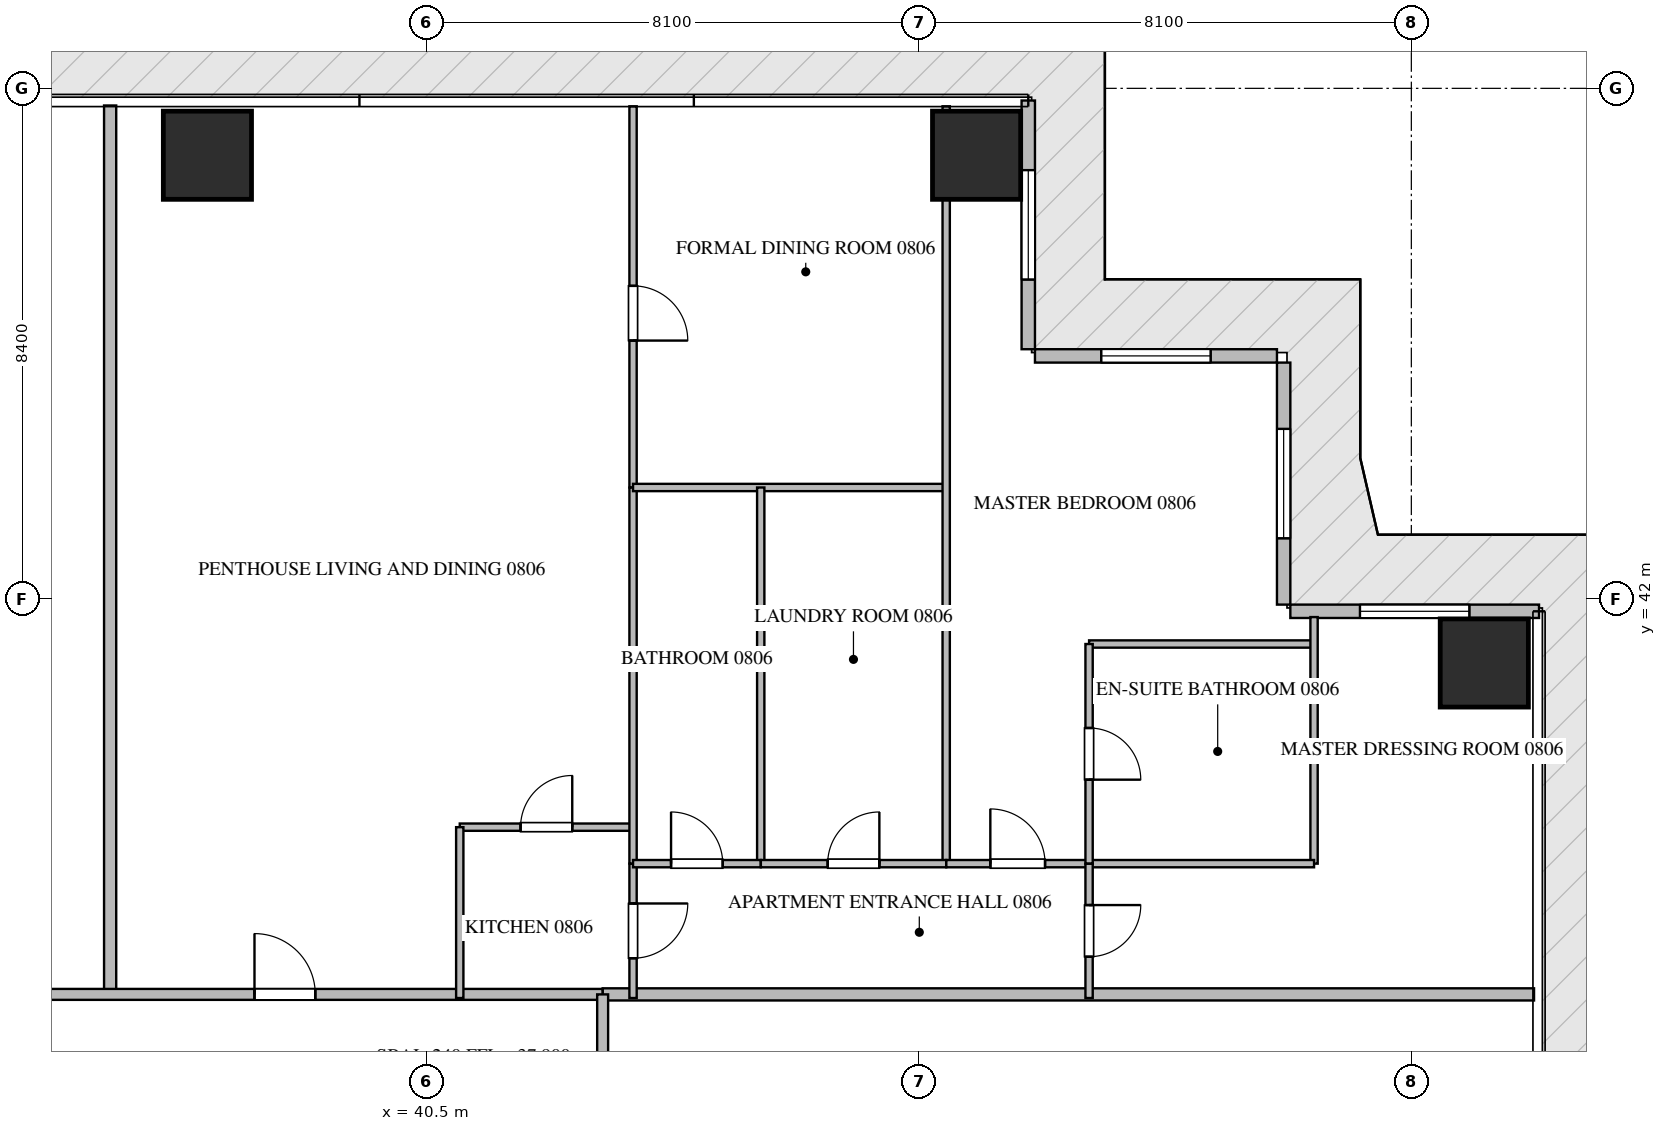
"""IFC4 building model, lengths in metres.
Left out: names, types, materials, properties, quantities, classifications, styles, units other than length and angle.
Written with IfcOpenShell. Run it as: python <this file> out.ifc"""

import sys

from ifc_helpers import new_model, si_unit, direction, frame, frame_2d, origin, origin_2d, place, context, subcontext, project, spatial, rectangle, extrude, source, transform, mapped, element, fill, save


model = new_model("IFC4")
c1 = context("Model", 3, precision=1e-05, world=origin(), true_north=direction((0.0, 1.0)))
c2 = subcontext(c1, "Body", "Model", "MODEL_VIEW")
j1 = project(units=[si_unit("LENGTHUNIT", "METRE"), si_unit("PLANEANGLEUNIT", "RADIAN")], contexts=[c1])
p1 = place(None, origin())
s1 = spatial("IfcSite", under=j1, at=p1, CompositionType="ELEMENT")
p2 = place(p1, origin())
s2 = spatial("IfcBuilding", under=s1, at=p2, CompositionType="ELEMENT")
p3 = place(p2, frame((0.0, 0.0, 37.95)))
s3 = spatial("IfcBuildingStorey", under=s2, at=p3, CompositionType="ELEMENT", Elevation=37.95)
m1 = source(origin(), c2, "Body", "SweptSolid", [
    extrude(rectangle(XDim=1.45, YDim=1.45, at=origin_2d()), origin(), (0.0, 0.0, 1.0), 3.75),
])
for number, where, z_axis, x_axis in (
    (1, (36.9, 49.3, -0.26), (0.0, 0.0, 1.0), (1.0, 0.0, 0.0)),
    (2, (49.55, 49.3, -0.26), (0.0, 0.0, 1.0), (1.0, 0.0, 0.0)),
    (3, (57.9, 40.95, -0.26), (0.0, 0.0, 1.0), (1.0, 0.0, 0.0)),
):
    element("IfcColumn", number, at=place(p3, frame(where, z_axis=z_axis, x_axis=x_axis)), inside=s3, PredefinedType="COLUMN", context=c2, shape_type="MappedRepresentation", body=[
        mapped(m1, transform((0.0, 0.0, 0.0), scale=1.0)),
    ])
p4 = place(p3, frame((58.8, 41.8, 0.0), z_axis=(0.0, 0.0, 1.0), x_axis=(-1.0, 0.0, 0.0)))
e4 = element("IfcWall", 4, at=p4, inside=s3, PredefinedType="ELEMENTEDWALL", context=c2, shape_type="SweptSolid", body=[
    extrude(rectangle(XDim=4.09, YDim=0.22, at=frame_2d((2.045, 0.0))), origin(), (0.0, 0.0, 1.0), 3.475),
])
p5 = place(p4, frame((1.145, 0.0, 0.65)))
e5 = element("IfcOpeningElement", 5, at=p5, cuts=e4, PredefinedType="OPENING", context=c2, shape_type="SweptSolid", body=[
    extrude(rectangle(XDim=1.8, YDim=2.1, at=frame_2d((0.9, 1.05))), frame((0.0, 0.12, 0.0), z_axis=(0.0, -1.0, 0.0), x_axis=(1.0, 0.0, 0.0)), (0.0, 0.0, 1.0), 0.24),
])
p6 = place(p3, frame((54.6, 41.91, 0.0), z_axis=(0.0, 0.0, 1.0), x_axis=(0.0, 1.0, 0.0)))
e6 = element("IfcWall", 6, at=p6, inside=s3, PredefinedType="ELEMENTEDWALL", context=c2, shape_type="SweptSolid", body=[
    extrude(rectangle(XDim=3.98, YDim=0.22, at=frame_2d((1.99, 0.0))), origin(), (0.0, 0.0, 1.0), 3.475),
])
p7 = place(p6, frame((1.09, 0.0, 0.65)))
e7 = element("IfcOpeningElement", 7, at=p7, cuts=e6, PredefinedType="OPENING", context=c2, shape_type="SweptSolid", body=[
    extrude(rectangle(XDim=1.8, YDim=2.1, at=frame_2d((0.9, 1.05))), frame((0.0, 0.12, 0.0), z_axis=(0.0, -1.0, 0.0), x_axis=(1.0, 0.0, 0.0)), (0.0, 0.0, 1.0), 0.24),
])
p8 = place(p3, frame((54.49, 46.0, 0.0), z_axis=(0.0, 0.0, 1.0), x_axis=(-1.0, 0.0, 0.0)))
e8 = element("IfcWall", 8, at=p8, inside=s3, PredefinedType="ELEMENTEDWALL", context=c2, shape_type="SweptSolid", body=[
    extrude(rectangle(XDim=3.98, YDim=0.22, at=frame_2d((1.99, 0.0))), origin(), (0.0, 0.0, 1.0), 3.475),
])
p9 = place(p8, frame((1.09, 0.0, 0.65)))
e9 = element("IfcOpeningElement", 9, at=p9, cuts=e8, PredefinedType="OPENING", context=c2, shape_type="SweptSolid", body=[
    extrude(rectangle(XDim=1.8, YDim=2.1, at=frame_2d((0.9, 1.05))), frame((0.0, 0.12, 0.0), z_axis=(0.0, -1.0, 0.0), x_axis=(1.0, 0.0, 0.0)), (0.0, 0.0, 1.0), 0.24),
])
p10 = place(p3, frame((50.4, 46.11, 0.0), z_axis=(0.0, 0.0, 1.0), x_axis=(0.0, 1.0, 0.0)))
e10 = element("IfcWall", 10, at=p10, inside=s3, PredefinedType="ELEMENTEDWALL", context=c2, shape_type="SweptSolid", body=[
    extrude(rectangle(XDim=4.09, YDim=0.22, at=frame_2d((2.045, 0.0))), origin(), (0.0, 0.0, 1.0), 3.475),
])
p11 = place(p10, frame((1.145, 0.0, 0.65)))
e11 = element("IfcOpeningElement", 11, at=p11, cuts=e10, PredefinedType="OPENING", context=c2, shape_type="SweptSolid", body=[
    extrude(rectangle(XDim=1.8, YDim=2.1, at=frame_2d((0.9, 1.05))), frame((0.0, 0.12, 0.0), z_axis=(0.0, -1.0, 0.0), x_axis=(1.0, 0.0, 0.0)), (0.0, 0.0, 1.0), 0.24),
])
p12 = place(p3, frame((35.3, 35.5, 0.0), z_axis=(0.0, 0.0, 1.0), x_axis=(0.0, 1.0, 0.0)))
e12 = element("IfcWall", 12, at=p12, inside=s3, PredefinedType="PARTITIONING", context=c2, shape_type="SweptSolid", body=[
    extrude(rectangle(XDim=14.618, YDim=0.2, at=frame_2d((7.309, 0.0))), origin(), (0.0, 0.0, 1.0), 3.49),
])
p13 = place(p3, frame((43.4, 35.5, 0.0), z_axis=(0.0, 0.0, 1.0), x_axis=(1.0, 0.0, 0.0)))
e13 = element("IfcWall", 13, at=p13, inside=s3, PredefinedType="PARTITIONING", context=c2, shape_type="SweptSolid", body=[
    extrude(rectangle(XDim=15.318, YDim=0.2, at=frame_2d((7.659, 0.0))), origin(), (0.0, 0.0, 1.0), 3.49),
])
p14 = place(p3, frame((21.402, 35.5, 0.0), z_axis=(0.0, 0.0, 1.0), x_axis=(1.0, 0.0, 0.0)))
e14 = element("IfcWall", 14, at=p14, inside=s3, PredefinedType="PARTITIONING", context=c2, shape_type="SweptSolid", body=[
    extrude(rectangle(XDim=21.996, YDim=0.18, at=frame_2d((10.998, 0.0))), origin(), (0.0, 0.0, 1.0), 3.49),
])
p15 = place(p14, frame((2.1, 0.0, 0.0)))
e15 = element("IfcOpeningElement", 15, at=p15, cuts=e14, PredefinedType="OPENING", context=c2, shape_type="SweptSolid", body=[
    extrude(rectangle(XDim=1.0, YDim=2.15, at=frame_2d((0.5, 1.075))), frame((0.0, 0.1, 0.0), z_axis=(0.0, -1.0, 0.0), x_axis=(1.0, 0.0, 0.0)), (0.0, 0.0, 1.0), 0.2),
])
p16 = place(p14, frame((10.498, 0.0, 0.0)))
e16 = element("IfcOpeningElement", 16, at=p16, cuts=e14, PredefinedType="OPENING", context=c2, shape_type="SweptSolid", body=[
    extrude(rectangle(XDim=1.0, YDim=2.15, at=frame_2d((0.5, 1.075))), frame((0.0, 0.1, 0.0), z_axis=(0.0, -1.0, 0.0), x_axis=(1.0, 0.0, 0.0)), (0.0, 0.0, 1.0), 0.2),
])
p17 = place(p14, frame((16.272, 0.0, 0.0)))
e17 = element("IfcOpeningElement", 17, at=p17, cuts=e14, PredefinedType="OPENING", context=c2, shape_type="SweptSolid", body=[
    extrude(rectangle(XDim=1.0, YDim=2.15, at=frame_2d((0.5, 1.075))), frame((0.0, 0.1, 0.0), z_axis=(0.0, -1.0, 0.0), x_axis=(1.0, 0.0, 0.0)), (0.0, 0.0, 1.0), 0.2),
])
p18 = place(p3, frame((43.4, 14.9, 0.0), z_axis=(0.0, 0.0, 1.0), x_axis=(0.0, 1.0, 0.0)))
e18 = element("IfcWall", 18, at=p18, inside=s3, PredefinedType="PARTITIONING", context=c2, shape_type="SweptSolid", body=[
    extrude(rectangle(XDim=20.6, YDim=0.18, at=frame_2d((10.3, 0.0))), origin(), (0.0, 0.0, 1.0), 3.49),
])
p19 = place(p18, frame((5.723, 0.0, 0.0)))
e19 = element("IfcOpeningElement", 19, at=p19, cuts=e18, PredefinedType="OPENING", context=c2, shape_type="SweptSolid", body=[
    extrude(rectangle(XDim=1.0, YDim=2.15, at=frame_2d((0.5, 1.075))), frame((0.0, 0.1, 0.0), z_axis=(0.0, -1.0, 0.0), x_axis=(1.0, 0.0, 0.0)), (0.0, 0.0, 1.0), 0.2),
])
p20 = place(p18, frame((17.64, 0.0, 0.0)))
e20 = element("IfcOpeningElement", 20, at=p20, cuts=e18, PredefinedType="OPENING", context=c2, shape_type="SweptSolid", body=[
    extrude(rectangle(XDim=1.0, YDim=2.15, at=frame_2d((0.5, 1.075))), frame((0.0, 0.1, 0.0), z_axis=(0.0, -1.0, 0.0), x_axis=(1.0, 0.0, 0.0)), (0.0, 0.0, 1.0), 0.2),
])
p21 = place(p3, frame((41.05, 38.25, 0.0), z_axis=(0.0, 0.0, 1.0), x_axis=(1.0, 0.0, 0.0)))
e21 = element("IfcWall", 21, at=p21, inside=s3, PredefinedType="PARTITIONING", context=c2, shape_type="SweptSolid", body=[
    extrude(rectangle(XDim=2.85, YDim=0.12, at=frame_2d((1.425, 0.0))), origin(), (0.0, 0.0, 1.0), 3.49),
])
p22 = place(p21, frame((1.0, 0.0, 0.0)))
e22 = element("IfcOpeningElement", 22, at=p22, cuts=e21, PredefinedType="OPENING", context=c2, shape_type="SweptSolid", body=[
    extrude(rectangle(XDim=0.85, YDim=2.1, at=frame_2d((0.425, 1.05))), frame((0.0, 0.07, 0.0), z_axis=(0.0, -1.0, 0.0), x_axis=(1.0, 0.0, 0.0)), (0.0, 0.0, 1.0), 0.14),
])
p23 = place(p3, frame((41.05, 38.25, 0.0), z_axis=(0.0, 0.0, 1.0), x_axis=(0.0, -1.0, 0.0)))
e23 = element("IfcWall", 23, at=p23, inside=s3, PredefinedType="PARTITIONING", context=c2, shape_type="SweptSolid", body=[
    extrude(rectangle(XDim=2.81, YDim=0.12, at=frame_2d((1.405, 0.0))), origin(), (0.0, 0.0, 1.0), 3.49),
])
p24 = place(p3, frame((43.9, 37.65, 0.0), z_axis=(0.0, 0.0, 1.0), x_axis=(0.0, -1.0, 0.0)))
e24 = element("IfcWall", 24, at=p24, inside=s3, PredefinedType="PARTITIONING", context=c2, shape_type="SweptSolid", body=[
    extrude(rectangle(XDim=2.21, YDim=0.12, at=frame_2d((1.105, 0.0))), origin(), (0.0, 0.0, 1.0), 3.49),
])
p25 = place(p24, frame((0.655, 0.0, 0.0)))
e25 = element("IfcOpeningElement", 25, at=p25, cuts=e24, PredefinedType="OPENING", context=c2, shape_type="SweptSolid", body=[
    extrude(rectangle(XDim=0.9, YDim=2.1, at=frame_2d((0.45, 1.05))), frame((0.0, 0.07, 0.0), z_axis=(0.0, -1.0, 0.0), x_axis=(1.0, 0.0, 0.0)), (0.0, 0.0, 1.0), 0.14),
])
p26 = place(p3, frame((43.9, 50.105, 0.0), z_axis=(0.0, 0.0, 1.0), x_axis=(0.0, -1.0, 0.0)))
e26 = element("IfcWall", 26, at=p26, inside=s3, PredefinedType="PARTITIONING", context=c2, shape_type="SweptSolid", body=[
    extrude(rectangle(XDim=6.269, YDim=0.12, at=frame_2d((3.135, 0.0))), origin(), (0.0, 0.0, 1.0), 3.49),
])
p27 = place(p26, frame((2.953, 0.0, 0.0)))
e27 = element("IfcOpeningElement", 27, at=p27, cuts=e26, PredefinedType="OPENING", context=c2, shape_type="SweptSolid", body=[
    extrude(rectangle(XDim=0.9, YDim=2.1, at=frame_2d((0.45, 1.05))), frame((0.0, 0.07, 0.0), z_axis=(0.0, -1.0, 0.0), x_axis=(1.0, 0.0, 0.0)), (0.0, 0.0, 1.0), 0.14),
])
p28 = place(p3, frame((43.9, 43.834, 0.0), z_axis=(0.0, 0.0, 1.0), x_axis=(0.0, -1.0, 0.0)))
e28 = element("IfcWall", 28, at=p28, inside=s3, PredefinedType="PARTITIONING", context=c2, shape_type="SweptSolid", body=[
    extrude(rectangle(XDim=6.182, YDim=0.12, at=frame_2d((3.091, 0.0))), origin(), (0.0, 0.0, 1.0), 3.49),
])
p29 = place(p3, frame((43.9, 43.836, 0.0), z_axis=(0.0, 0.0, 1.0), x_axis=(1.0, 0.0, 0.0)))
e29 = element("IfcWall", 29, at=p29, inside=s3, PredefinedType="PARTITIONING", context=c2, shape_type="SweptSolid", body=[
    extrude(rectangle(XDim=5.15, YDim=0.12, at=frame_2d((2.575, 0.0))), origin(), (0.0, 0.0, 1.0), 3.49),
])
p30 = place(p3, frame((49.05, 50.105, 0.0), z_axis=(0.0, 0.0, 1.0), x_axis=(0.0, -1.0, 0.0)))
e30 = element("IfcWall", 30, at=p30, inside=s3, PredefinedType="PARTITIONING", context=c2, shape_type="SweptSolid", body=[
    extrude(rectangle(XDim=12.455, YDim=0.12, at=frame_2d((6.228, 0.0))), origin(), (0.0, 0.0, 1.0), 3.49),
])
p31 = place(p3, frame((46.0, 43.836, 0.0), z_axis=(0.0, 0.0, 1.0), x_axis=(0.0, -1.0, 0.0)))
e31 = element("IfcWall", 31, at=p31, inside=s3, PredefinedType="PARTITIONING", context=c2, shape_type="SweptSolid", body=[
    extrude(rectangle(XDim=6.186, YDim=0.12, at=frame_2d((3.093, 0.0))), origin(), (0.0, 0.0, 1.0), 3.49),
])
p32 = place(p3, frame((43.9, 37.65, 0.0), z_axis=(0.0, 0.0, 1.0), x_axis=(1.0, 0.0, 0.0)))
e32 = element("IfcWall", 32, at=p32, inside=s3, PredefinedType="PARTITIONING", context=c2, shape_type="SweptSolid", body=[
    extrude(rectangle(XDim=2.1, YDim=0.12, at=frame_2d((1.05, 0.0))), origin(), (0.0, 0.0, 1.0), 3.49),
])
p33 = place(p32, frame((0.625, 0.0, 0.0)))
e33 = element("IfcOpeningElement", 33, at=p33, cuts=e32, PredefinedType="OPENING", context=c2, shape_type="SweptSolid", body=[
    extrude(rectangle(XDim=0.85, YDim=2.1, at=frame_2d((0.425, 1.05))), frame((0.0, 0.07, 0.0), z_axis=(0.0, -1.0, 0.0), x_axis=(1.0, 0.0, 0.0)), (0.0, 0.0, 1.0), 0.14),
])
p34 = place(p3, frame((46.002, 37.65, 0.0), z_axis=(0.0, 0.0, 1.0), x_axis=(1.0, 0.0, 0.0)))
e34 = element("IfcWall", 34, at=p34, inside=s3, PredefinedType="PARTITIONING", context=c2, shape_type="SweptSolid", body=[
    extrude(rectangle(XDim=3.048, YDim=0.12, at=frame_2d((1.524, 0.0))), origin(), (0.0, 0.0, 1.0), 3.49),
])
p35 = place(p34, frame((1.099, 0.0, 0.0)))
e35 = element("IfcOpeningElement", 35, at=p35, cuts=e34, PredefinedType="OPENING", context=c2, shape_type="SweptSolid", body=[
    extrude(rectangle(XDim=0.85, YDim=2.1, at=frame_2d((0.425, 1.05))), frame((0.0, 0.07, 0.0), z_axis=(0.0, -1.0, 0.0), x_axis=(1.0, 0.0, 0.0)), (0.0, 0.0, 1.0), 0.14),
])
p36 = place(p3, frame((49.052, 37.65, 0.0), z_axis=(0.0, 0.0, 1.0), x_axis=(1.0, 0.0, 0.0)))
e36 = element("IfcWall", 36, at=p36, inside=s3, PredefinedType="PARTITIONING", context=c2, shape_type="SweptSolid", body=[
    extrude(rectangle(XDim=2.348, YDim=0.12, at=frame_2d((1.174, 0.0))), origin(), (0.0, 0.0, 1.0), 3.49),
])
p37 = place(p36, frame((0.724, 0.0, 0.0)))
e37 = element("IfcOpeningElement", 37, at=p37, cuts=e36, PredefinedType="OPENING", context=c2, shape_type="SweptSolid", body=[
    extrude(rectangle(XDim=0.9, YDim=2.1, at=frame_2d((0.45, 1.05))), frame((0.0, 0.07, 0.0), z_axis=(0.0, -1.0, 0.0), x_axis=(1.0, 0.0, 0.0)), (0.0, 0.0, 1.0), 0.14),
])
p38 = place(p3, frame((51.4, 41.262, 0.0), z_axis=(0.0, 0.0, 1.0), x_axis=(1.0, 0.0, 0.0)))
e38 = element("IfcWall", 38, at=p38, inside=s3, PredefinedType="PARTITIONING", context=c2, shape_type="SweptSolid", body=[
    extrude(rectangle(XDim=3.7, YDim=0.12, at=frame_2d((1.85, 0.0))), origin(), (0.0, 0.0, 1.0), 3.49),
])
p39 = place(p3, frame((55.1, 41.705, 0.0), z_axis=(0.0, 0.0, 1.0), x_axis=(0.0, -1.0, 0.0)))
e39 = element("IfcWall", 39, at=p39, inside=s3, PredefinedType="PARTITIONING", context=c2, shape_type="SweptSolid", body=[
    extrude(rectangle(XDim=4.055, YDim=0.12, at=frame_2d((2.028, 0.0))), origin(), (0.0, 0.0, 1.0), 3.49),
])
p40 = place(p3, frame((51.402, 37.65, 0.0), z_axis=(0.0, 0.0, 1.0), x_axis=(1.0, 0.0, 0.0)))
e40 = element("IfcWall", 40, at=p40, inside=s3, PredefinedType="PARTITIONING", context=c2, shape_type="SweptSolid", body=[
    extrude(rectangle(XDim=3.698, YDim=0.12, at=frame_2d((1.849, 0.0))), origin(), (0.0, 0.0, 1.0), 3.49),
])
p41 = place(p3, frame((51.4, 41.262, 0.0), z_axis=(0.0, 0.0, 1.0), x_axis=(0.0, -1.0, 0.0)))
e41 = element("IfcWall", 41, at=p41, inside=s3, PredefinedType="PARTITIONING", context=c2, shape_type="SweptSolid", body=[
    extrude(rectangle(XDim=3.612, YDim=0.12, at=frame_2d((1.806, 0.0))), origin(), (0.0, 0.0, 1.0), 3.49),
])
p42 = place(p41, frame((1.381, 0.0, 0.0)))
e42 = element("IfcOpeningElement", 42, at=p42, cuts=e41, PredefinedType="OPENING", context=c2, shape_type="SweptSolid", body=[
    extrude(rectangle(XDim=0.85, YDim=2.1, at=frame_2d((0.425, 1.05))), frame((0.0, 0.07, 0.0), z_axis=(0.0, -1.0, 0.0), x_axis=(1.0, 0.0, 0.0)), (0.0, 0.0, 1.0), 0.14),
])
p43 = place(p3, frame((51.4, 37.648, 0.0), z_axis=(0.0, 0.0, 1.0), x_axis=(0.0, -1.0, 0.0)))
e43 = element("IfcWall", 43, at=p43, inside=s3, PredefinedType="PARTITIONING", context=c2, shape_type="SweptSolid", body=[
    extrude(rectangle(XDim=2.208, YDim=0.12, at=frame_2d((1.104, 0.0))), origin(), (0.0, 0.0, 1.0), 3.49),
])
p44 = place(p43, frame((0.679, 0.0, 0.0)))
e44 = element("IfcOpeningElement", 44, at=p44, cuts=e43, PredefinedType="OPENING", context=c2, shape_type="SweptSolid", body=[
    extrude(rectangle(XDim=0.85, YDim=2.1, at=frame_2d((0.425, 1.05))), frame((0.0, 0.07, 0.0), z_axis=(0.0, -1.0, 0.0), x_axis=(1.0, 0.0, 0.0)), (0.0, 0.0, 1.0), 0.14),
])
m2 = source(origin(), c2, "Body", "SweptSolid", [
    extrude(rectangle(XDim=1.8, YDim=2.1, at=frame_2d((0.9, 1.05))), frame((0.0, 0.03, 0.0), z_axis=(0.0, -1.0, 0.0), x_axis=(1.0, 0.0, 0.0)), (0.0, 0.0, 1.0), 0.06),
])
p45 = place(p5, origin())
e45 = element("IfcWindow", 45, at=p45, inside=s3, PartitioningType="SINGLE_PANEL", PredefinedType="WINDOW", context=c2, shape_type="MappedRepresentation", body=[
    mapped(m2, transform((0.0, 0.0, 0.0), scale=1.0)),
])
fill(e5, e45)
p46 = place(p7, origin())
e46 = element("IfcWindow", 46, at=p46, inside=s3, PartitioningType="SINGLE_PANEL", PredefinedType="WINDOW", context=c2, shape_type="MappedRepresentation", body=[
    mapped(m2, transform((0.0, 0.0, 0.0), scale=1.0)),
])
fill(e7, e46)
p47 = place(p9, origin())
e47 = element("IfcWindow", 47, at=p47, inside=s3, PartitioningType="SINGLE_PANEL", PredefinedType="WINDOW", context=c2, shape_type="MappedRepresentation", body=[
    mapped(m2, transform((0.0, 0.0, 0.0), scale=1.0)),
])
fill(e9, e47)
p48 = place(p11, origin())
e48 = element("IfcWindow", 48, at=p48, inside=s3, PartitioningType="SINGLE_PANEL", PredefinedType="WINDOW", context=c2, shape_type="MappedRepresentation", body=[
    mapped(m2, transform((0.0, 0.0, 0.0), scale=1.0)),
])
fill(e11, e48)
m3 = source(origin(), c2, "Body", "SweptSolid", [
    extrude(rectangle(XDim=1.0, YDim=2.15, at=frame_2d((0.5, 1.075))), frame((0.0, 0.025, 0.0), z_axis=(0.0, -1.0, 0.0), x_axis=(1.0, 0.0, 0.0)), (0.0, 0.0, 1.0), 0.05),
])
p49 = place(p17, origin())
e49 = element("IfcDoor", 49, at=p49, inside=s3, OperationType="SINGLE_SWING_LEFT", PredefinedType="DOOR", context=c2, shape_type="MappedRepresentation", body=[
    mapped(m3, transform((0.0, 0.0, 0.0), scale=1.0)),
])
fill(e17, e49)
m4 = source(origin(), c2, "Body", "SweptSolid", [
    extrude(rectangle(XDim=0.85, YDim=2.1, at=frame_2d((0.425, 1.05))), frame((0.0, 0.025, 0.0), z_axis=(0.0, -1.0, 0.0), x_axis=(1.0, 0.0, 0.0)), (0.0, 0.0, 1.0), 0.05),
])
p50 = place(p22, origin())
e50 = element("IfcDoor", 50, at=p50, inside=s3, OperationType="SINGLE_SWING_RIGHT", PredefinedType="DOOR", context=c2, shape_type="MappedRepresentation", body=[
    mapped(m4, transform((0.0, 0.0, 0.0), scale=1.0)),
])
fill(e22, e50)
m5 = source(origin(), c2, "Body", "SweptSolid", [
    extrude(rectangle(XDim=0.9, YDim=2.1, at=frame_2d((0.45, 1.05))), frame((0.0, 0.025, 0.0), z_axis=(0.0, -1.0, 0.0), x_axis=(1.0, 0.0, 0.0)), (0.0, 0.0, 1.0), 0.05),
])
p51 = place(p25, origin())
e51 = element("IfcDoor", 51, at=p51, inside=s3, OperationType="SINGLE_SWING_LEFT", PredefinedType="DOOR", context=c2, shape_type="MappedRepresentation", body=[
    mapped(m5, transform((0.0, 0.0, 0.0), scale=1.0)),
])
fill(e25, e51)
p52 = place(p27, origin())
e52 = element("IfcDoor", 52, at=p52, inside=s3, OperationType="SINGLE_SWING_RIGHT", PredefinedType="DOOR", context=c2, shape_type="MappedRepresentation", body=[
    mapped(m5, transform((0.0, 0.0, 0.0), scale=1.0)),
])
fill(e27, e52)
p53 = place(p33, origin())
e53 = element("IfcDoor", 53, at=p53, inside=s3, OperationType="SINGLE_SWING_LEFT", PredefinedType="DOOR", context=c2, shape_type="MappedRepresentation", body=[
    mapped(m4, transform((0.0, 0.0, 0.0), scale=1.0)),
])
fill(e33, e53)
p54 = place(p35, origin())
e54 = element("IfcDoor", 54, at=p54, inside=s3, OperationType="SINGLE_SWING_RIGHT", PredefinedType="DOOR", context=c2, shape_type="MappedRepresentation", body=[
    mapped(m4, transform((0.0, 0.0, 0.0), scale=1.0)),
])
fill(e35, e54)
p55 = place(p37, origin())
e55 = element("IfcDoor", 55, at=p55, inside=s3, OperationType="SINGLE_SWING_LEFT", PredefinedType="DOOR", context=c2, shape_type="MappedRepresentation", body=[
    mapped(m5, transform((0.0, 0.0, 0.0), scale=1.0)),
])
fill(e37, e55)
p56 = place(p42, origin())
e56 = element("IfcDoor", 56, at=p56, inside=s3, OperationType="SINGLE_SWING_RIGHT", PredefinedType="DOOR", context=c2, shape_type="MappedRepresentation", body=[
    mapped(m4, transform((0.0, 0.0, 0.0), scale=1.0)),
])
fill(e42, e56)
p57 = place(p44, origin())
e57 = element("IfcDoor", 57, at=p57, inside=s3, OperationType="SINGLE_SWING_LEFT", PredefinedType="DOOR", context=c2, shape_type="MappedRepresentation", body=[
    mapped(m4, transform((0.0, 0.0, 0.0), scale=1.0)),
])
fill(e44, e57)
save(model, sys.argv[1])
